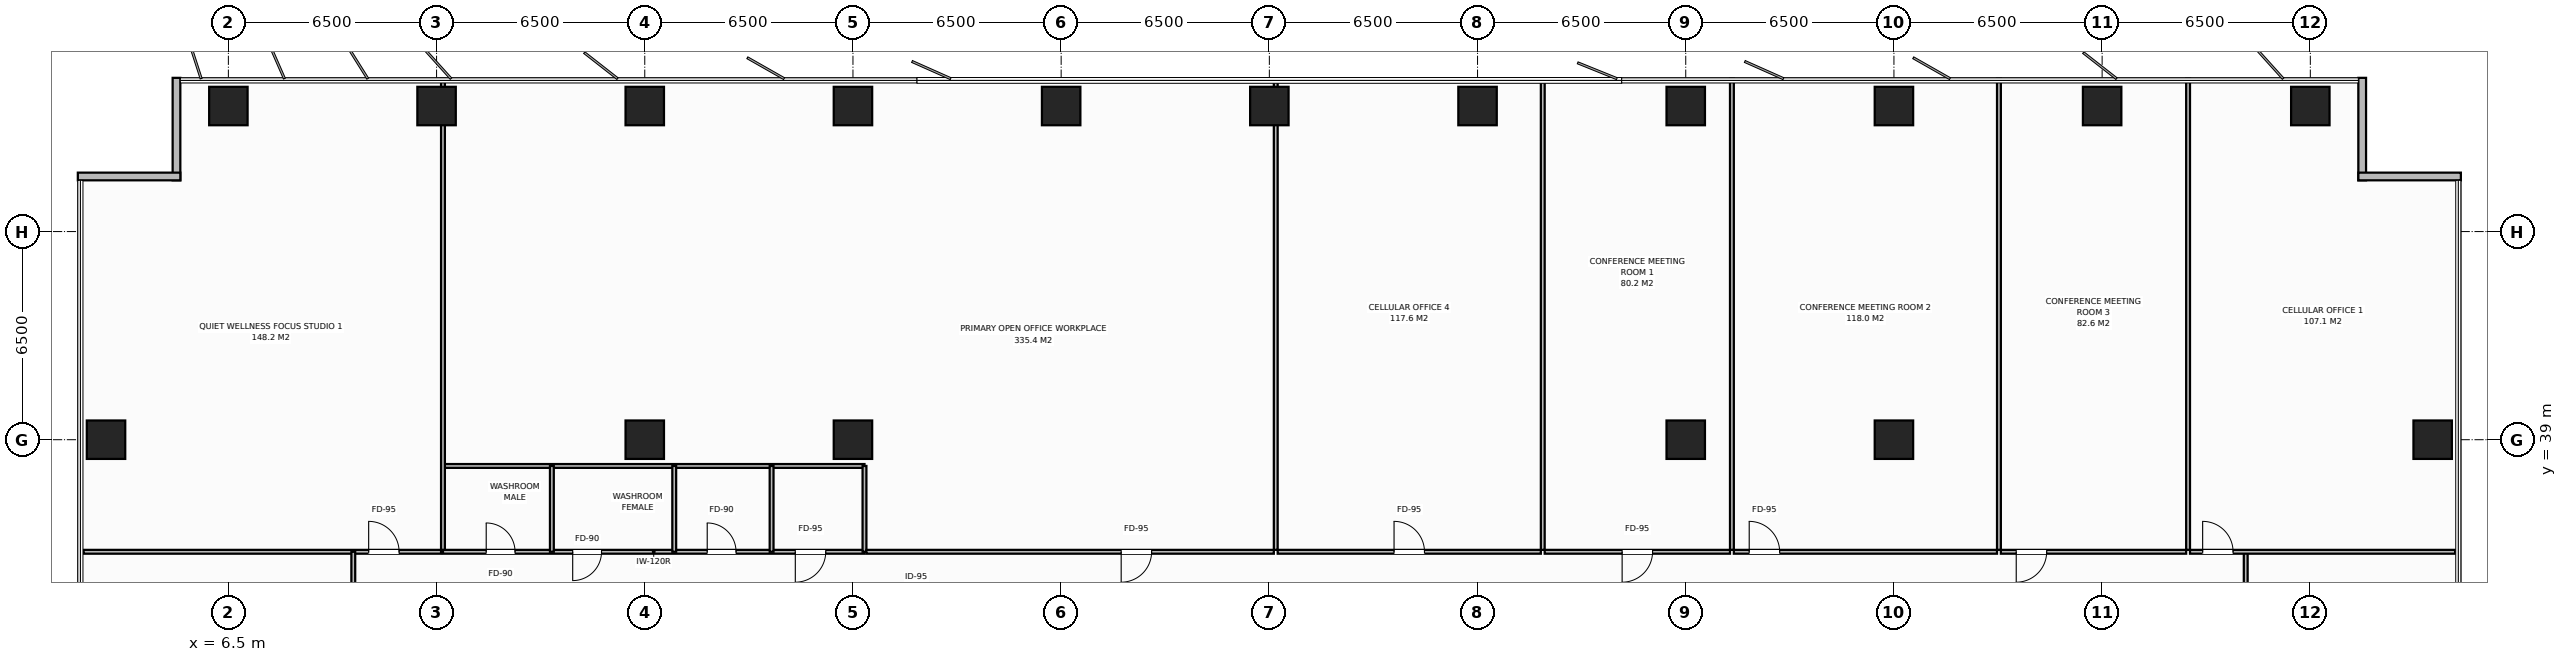
"""IFC4 building model, lengths in metres.
Left out: names, types, materials, properties, quantities, classifications, styles, units other than length and angle.
Written with IfcOpenShell. Run it as: python <this file> out.ifc"""

import sys

from ifc_helpers import new_model, si_unit, direction, frame, frame_2d, origin, origin_2d, place, context, subcontext, project, spatial, rectangle, extrude, element, fill, save


model = new_model("IFC4")
c1 = context("Model", 3, precision=1e-05, world=origin(), true_north=direction((0.0, 1.0)))
c2 = subcontext(c1, "Body", "Model", "MODEL_VIEW")
j1 = project(units=[si_unit("LENGTHUNIT", "METRE"), si_unit("PLANEANGLEUNIT", "RADIAN")], contexts=[c1])
p1 = place(None, origin())
s1 = spatial("IfcSite", under=j1, at=p1, CompositionType="ELEMENT")
p2 = place(p1, origin())
s2 = spatial("IfcBuilding", under=s1, at=p2, CompositionType="ELEMENT")
p3 = place(p2, frame((0.0, 0.0, 108.8)))
s3 = spatial("IfcBuildingStorey", under=s2, at=p3, CompositionType="ELEMENT", Elevation=108.8)
for number, where, z_axis, x_axis in (
    (1, (19.5, 39.0, 0.0), (0.0, 0.0, 1.0), (1.0, 0.0, 0.0)),
    (2, (58.5, 39.0, 0.0), (0.0, 0.0, 1.0), (1.0, 0.0, 0.0)),
    (3, (26.0, 39.0, 0.0), (0.0, 0.0, 1.0), (1.0, 0.0, 0.0)),
    (4, (52.0, 39.0, 0.0), (0.0, 0.0, 1.0), (1.0, 0.0, 0.0)),
    (5, (6.5, 49.42, 0.0), (0.0, 0.0, 1.0), (1.0, 0.0, 0.0)),
    (6, (13.0, 49.42, 0.0), (0.0, 0.0, 1.0), (1.0, 0.0, 0.0)),
    (7, (19.5, 49.42, 0.0), (0.0, 0.0, 1.0), (1.0, 0.0, 0.0)),
    (8, (26.0, 49.42, 0.0), (0.0, 0.0, 1.0), (1.0, 0.0, 0.0)),
    (9, (32.5, 49.42, 0.0), (0.0, 0.0, 1.0), (1.0, 0.0, 0.0)),
    (10, (39.0, 49.42, 0.0), (0.0, 0.0, 1.0), (1.0, 0.0, 0.0)),
    (11, (45.5, 49.42, 0.0), (0.0, 0.0, 1.0), (1.0, 0.0, 0.0)),
    (12, (52.0, 49.42, 0.0), (0.0, 0.0, 1.0), (1.0, 0.0, 0.0)),
    (13, (58.5, 49.42, 0.0), (0.0, 0.0, 1.0), (1.0, 0.0, 0.0)),
    (14, (65.0, 49.42, 0.0), (0.0, 0.0, 1.0), (1.0, 0.0, 0.0)),
    (15, (71.5, 49.42, 0.0), (0.0, 0.0, 1.0), (1.0, 0.0, 0.0)),
    (16, (2.68, 39.0, 0.0), (0.0, 0.0, 1.0), (1.0, 0.0, 0.0)),
    (17, (75.32, 39.0, 0.0), (0.0, 0.0, 1.0), (1.0, 0.0, 0.0)),
):
    element("IfcColumn", number, at=place(p3, frame(where, z_axis=z_axis, x_axis=x_axis)), inside=s3, PredefinedType="COLUMN", context=c2, shape_type="SweptSolid", body=[
        extrude(rectangle(XDim=1.2, YDim=1.2, at=origin_2d()), origin(), (0.0, 0.0, 1.0), 3.8),
    ])
for number, where, z_axis, x_axis in (
    (18, (4.88, 47.1, 0.0), (0.0, 0.0, 1.0), (0.0, 1.0, 0.0)),
    (19, (1.8, 47.22, 0.0), (0.0, 0.0, 1.0), (1.0, 0.0, 0.0)),
    (20, (73.12, 50.3, 0.0), (0.0, 0.0, 1.0), (0.0, -1.0, 0.0)),
    (21, (73.0, 47.22, 0.0), (0.0, 0.0, 1.0), (1.0, 0.0, 0.0)),
):
    element("IfcWall", number, at=place(p3, frame(where, z_axis=z_axis, x_axis=x_axis)), inside=s3, PredefinedType="STANDARD", context=c2, shape_type="SweptSolid", body=[
        extrude(rectangle(XDim=3.2, YDim=0.24, at=frame_2d((1.6, 0.0))), origin(), (0.0, 0.0, 1.0), 3.565),
    ])
p4 = place(p3, frame((69.483, 33.4, 0.0), z_axis=(0.0, 0.0, 1.0), x_axis=(0.0, 1.0, 0.0)))
e22 = element("IfcWall", 22, at=p4, inside=s3, PredefinedType="PARTITIONING", context=c2, shape_type="SweptSolid", body=[
    extrude(rectangle(XDim=2.1, YDim=0.12, at=frame_2d((1.05, 0.0))), origin(), (0.0, 0.0, 1.0), 3.565),
])
p5 = place(p3, frame((13.2, 35.5, 0.0), z_axis=(0.0, 0.0, 1.0), x_axis=(1.0, 0.0, 0.0)))
e23 = element("IfcWall", 23, at=p5, inside=s3, PredefinedType="PARTITIONING", context=c2, shape_type="SweptSolid", body=[
    extrude(rectangle(XDim=13.16, YDim=0.12, at=frame_2d((6.58, 0.0))), origin(), (0.0, 0.0, 1.0), 3.565),
])
p6 = place(p5, frame((1.35, 0.0, 0.0)))
e24 = element("IfcOpeningElement", 24, at=p6, cuts=e23, PredefinedType="OPENING", context=c2, shape_type="SweptSolid", body=[
    extrude(rectangle(XDim=0.9, YDim=2.15, at=frame_2d((0.45, 1.075))), frame((0.0, 0.07, 0.0), z_axis=(0.0, -1.0, 0.0), x_axis=(1.0, 0.0, 0.0)), (0.0, 0.0, 1.0), 0.14),
])
p7 = place(p5, frame((4.05, 0.0, 0.0)))
e25 = element("IfcOpeningElement", 25, at=p7, cuts=e23, PredefinedType="OPENING", context=c2, shape_type="SweptSolid", body=[
    extrude(rectangle(XDim=0.9, YDim=2.15, at=frame_2d((0.45, 1.075))), frame((0.0, 0.07, 0.0), z_axis=(0.0, -1.0, 0.0), x_axis=(1.0, 0.0, 0.0)), (0.0, 0.0, 1.0), 0.14),
])
p8 = place(p5, frame((8.25, 0.0, 0.0)))
e26 = element("IfcOpeningElement", 26, at=p8, cuts=e23, PredefinedType="OPENING", context=c2, shape_type="SweptSolid", body=[
    extrude(rectangle(XDim=0.9, YDim=2.15, at=frame_2d((0.45, 1.075))), frame((0.0, 0.07, 0.0), z_axis=(0.0, -1.0, 0.0), x_axis=(1.0, 0.0, 0.0)), (0.0, 0.0, 1.0), 0.14),
])
p9 = place(p5, frame((11.0, 0.0, 0.0)))
e27 = element("IfcOpeningElement", 27, at=p9, cuts=e23, PredefinedType="OPENING", context=c2, shape_type="SweptSolid", body=[
    extrude(rectangle(XDim=0.95, YDim=2.15, at=frame_2d((0.475, 1.075))), frame((0.0, 0.07, 0.0), z_axis=(0.0, -1.0, 0.0), x_axis=(1.0, 0.0, 0.0)), (0.0, 0.0, 1.0), 0.14),
])
p10 = place(p3, frame((13.2, 38.18, 0.0), z_axis=(0.0, 0.0, 1.0), x_axis=(1.0, 0.0, 0.0)))
e28 = element("IfcWall", 28, at=p10, inside=s3, PredefinedType="PARTITIONING", context=c2, shape_type="SweptSolid", body=[
    extrude(rectangle(XDim=13.16, YDim=0.12, at=frame_2d((6.58, 0.0))), origin(), (0.0, 0.0, 1.0), 3.565),
])
for number, where, z_axis, x_axis in (
    (29, (16.6, 35.5, 0.0), (0.0, 0.0, 1.0), (0.0, 1.0, 0.0)),
    (30, (20.42, 35.5, 0.0), (0.0, 0.0, 1.0), (0.0, 1.0, 0.0)),
    (31, (23.46, 35.5, 0.0), (0.0, 0.0, 1.0), (0.0, 1.0, 0.0)),
    (32, (26.36, 35.5, 0.0), (0.0, 0.0, 1.0), (0.0, 1.0, 0.0)),
):
    element("IfcWall", number, at=place(p3, frame(where, z_axis=z_axis, x_axis=x_axis)), inside=s3, PredefinedType="PARTITIONING", context=c2, shape_type="SweptSolid", body=[
        extrude(rectangle(XDim=2.68, YDim=0.12, at=frame_2d((1.34, 0.0))), origin(), (0.0, 0.0, 1.0), 3.565),
    ])
p11 = place(p3, frame((13.2, 35.56, 0.0), z_axis=(0.0, 0.0, 1.0), x_axis=(0.0, 1.0, 0.0)))
e33 = element("IfcWall", 33, at=p11, inside=s3, PredefinedType="PARTITIONING", context=c2, shape_type="SweptSolid", body=[
    extrude(rectangle(XDim=14.72, YDim=0.12, at=frame_2d((7.36, 0.0))), origin(), (0.0, 0.0, 1.0), 2.965),
])
p12 = place(p3, frame((1.98, 35.5, 0.0), z_axis=(0.0, 0.0, 1.0), x_axis=(1.0, 0.0, 0.0)))
e34 = element("IfcWall", 34, at=p12, inside=s3, PredefinedType="PARTITIONING", context=c2, shape_type="SweptSolid", body=[
    extrude(rectangle(XDim=11.16, YDim=0.12, at=frame_2d((5.58, 0.0))), origin(), (0.0, 0.0, 1.0), 3.565),
])
p13 = place(p12, frame((8.9, 0.0, 0.0)))
e35 = element("IfcOpeningElement", 35, at=p13, cuts=e34, PredefinedType="OPENING", context=c2, shape_type="SweptSolid", body=[
    extrude(rectangle(XDim=0.95, YDim=2.15, at=frame_2d((0.475, 1.075))), frame((0.0, 0.07, 0.0), z_axis=(0.0, -1.0, 0.0), x_axis=(1.0, 0.0, 0.0)), (0.0, 0.0, 1.0), 0.14),
])
p14 = place(p3, frame((39.2, 35.56, 0.0), z_axis=(0.0, 0.0, 1.0), x_axis=(0.0, 1.0, 0.0)))
e36 = element("IfcWall", 36, at=p14, inside=s3, PredefinedType="PARTITIONING", context=c2, shape_type="SweptSolid", body=[
    extrude(rectangle(XDim=14.72, YDim=0.12, at=frame_2d((7.36, 0.0))), origin(), (0.0, 0.0, 1.0), 2.965),
])
p15 = place(p3, frame((26.42, 35.5, 0.0), z_axis=(0.0, 0.0, 1.0), x_axis=(1.0, 0.0, 0.0)))
e37 = element("IfcWall", 37, at=p15, inside=s3, PredefinedType="PARTITIONING", context=c2, shape_type="SweptSolid", body=[
    extrude(rectangle(XDim=12.72, YDim=0.12, at=frame_2d((6.36, 0.0))), origin(), (0.0, 0.0, 1.0), 3.565),
])
p16 = place(p15, frame((7.954, 0.0, 0.0)))
e38 = element("IfcOpeningElement", 38, at=p16, cuts=e37, PredefinedType="OPENING", context=c2, shape_type="SweptSolid", body=[
    extrude(rectangle(XDim=0.95, YDim=2.15, at=frame_2d((0.475, 1.075))), frame((0.0, 0.07, 0.0), z_axis=(0.0, -1.0, 0.0), x_axis=(1.0, 0.0, 0.0)), (0.0, 0.0, 1.0), 0.14),
])
p17 = place(p3, frame((47.537, 35.56, 0.0), z_axis=(0.0, 0.0, 1.0), x_axis=(0.0, 1.0, 0.0)))
e39 = element("IfcWall", 39, at=p17, inside=s3, PredefinedType="PARTITIONING", context=c2, shape_type="SweptSolid", body=[
    extrude(rectangle(XDim=14.72, YDim=0.12, at=frame_2d((7.36, 0.0))), origin(), (0.0, 0.0, 1.0), 3.565),
])
p18 = place(p3, frame((39.26, 35.5, 0.0), z_axis=(0.0, 0.0, 1.0), x_axis=(1.0, 0.0, 0.0)))
e40 = element("IfcWall", 40, at=p18, inside=s3, PredefinedType="PARTITIONING", context=c2, shape_type="SweptSolid", body=[
    extrude(rectangle(XDim=8.217, YDim=0.12, at=frame_2d((4.108, 0.0))), origin(), (0.0, 0.0, 1.0), 3.565),
])
p19 = place(p18, frame((3.633, 0.0, 0.0)))
e41 = element("IfcOpeningElement", 41, at=p19, cuts=e40, PredefinedType="OPENING", context=c2, shape_type="SweptSolid", body=[
    extrude(rectangle(XDim=0.95, YDim=2.15, at=frame_2d((0.475, 1.075))), frame((0.0, 0.07, 0.0), z_axis=(0.0, -1.0, 0.0), x_axis=(1.0, 0.0, 0.0)), (0.0, 0.0, 1.0), 0.14),
])
p20 = place(p3, frame((53.442, 35.56, 0.0), z_axis=(0.0, 0.0, 1.0), x_axis=(0.0, 1.0, 0.0)))
e42 = element("IfcWall", 42, at=p20, inside=s3, PredefinedType="PARTITIONING", context=c2, shape_type="SweptSolid", body=[
    extrude(rectangle(XDim=14.72, YDim=0.12, at=frame_2d((7.36, 0.0))), origin(), (0.0, 0.0, 1.0), 3.565),
])
p21 = place(p3, frame((47.597, 35.5, 0.0), z_axis=(0.0, 0.0, 1.0), x_axis=(1.0, 0.0, 0.0)))
e43 = element("IfcWall", 43, at=p21, inside=s3, PredefinedType="PARTITIONING", context=c2, shape_type="SweptSolid", body=[
    extrude(rectangle(XDim=5.785, YDim=0.12, at=frame_2d((2.893, 0.0))), origin(), (0.0, 0.0, 1.0), 3.565),
])
p22 = place(p21, frame((2.417, 0.0, 0.0)))
e44 = element("IfcOpeningElement", 44, at=p22, cuts=e43, PredefinedType="OPENING", context=c2, shape_type="SweptSolid", body=[
    extrude(rectangle(XDim=0.95, YDim=2.15, at=frame_2d((0.475, 1.075))), frame((0.0, 0.07, 0.0), z_axis=(0.0, -1.0, 0.0), x_axis=(1.0, 0.0, 0.0)), (0.0, 0.0, 1.0), 0.14),
])
p23 = place(p3, frame((61.778, 35.56, 0.0), z_axis=(0.0, 0.0, 1.0), x_axis=(0.0, 1.0, 0.0)))
e45 = element("IfcWall", 45, at=p23, inside=s3, PredefinedType="PARTITIONING", context=c2, shape_type="SweptSolid", body=[
    extrude(rectangle(XDim=14.72, YDim=0.12, at=frame_2d((7.36, 0.0))), origin(), (0.0, 0.0, 1.0), 3.565),
])
p24 = place(p3, frame((53.502, 35.5, 0.0), z_axis=(0.0, 0.0, 1.0), x_axis=(1.0, 0.0, 0.0)))
e46 = element("IfcWall", 46, at=p24, inside=s3, PredefinedType="PARTITIONING", context=c2, shape_type="SweptSolid", body=[
    extrude(rectangle(XDim=8.217, YDim=0.12, at=frame_2d((4.108, 0.0))), origin(), (0.0, 0.0, 1.0), 3.565),
])
p25 = place(p24, frame((0.48, 0.0, 0.0)))
e47 = element("IfcOpeningElement", 47, at=p25, cuts=e46, PredefinedType="OPENING", context=c2, shape_type="SweptSolid", body=[
    extrude(rectangle(XDim=0.95, YDim=2.15, at=frame_2d((0.475, 1.075))), frame((0.0, 0.07, 0.0), z_axis=(0.0, -1.0, 0.0), x_axis=(1.0, 0.0, 0.0)), (0.0, 0.0, 1.0), 0.14),
])
p26 = place(p3, frame((67.683, 35.56, 0.0), z_axis=(0.0, 0.0, 1.0), x_axis=(0.0, 1.0, 0.0)))
e48 = element("IfcWall", 48, at=p26, inside=s3, PredefinedType="PARTITIONING", context=c2, shape_type="SweptSolid", body=[
    extrude(rectangle(XDim=14.72, YDim=0.12, at=frame_2d((7.36, 0.0))), origin(), (0.0, 0.0, 1.0), 3.565),
])
p27 = place(p3, frame((61.838, 35.5, 0.0), z_axis=(0.0, 0.0, 1.0), x_axis=(1.0, 0.0, 0.0)))
e49 = element("IfcWall", 49, at=p27, inside=s3, PredefinedType="PARTITIONING", context=c2, shape_type="SweptSolid", body=[
    extrude(rectangle(XDim=5.785, YDim=0.12, at=frame_2d((2.893, 0.0))), origin(), (0.0, 0.0, 1.0), 3.565),
])
p28 = place(p27, frame((0.48, 0.0, 0.0)))
e50 = element("IfcOpeningElement", 50, at=p28, cuts=e49, PredefinedType="OPENING", context=c2, shape_type="SweptSolid", body=[
    extrude(rectangle(XDim=0.95, YDim=2.15, at=frame_2d((0.475, 1.075))), frame((0.0, 0.07, 0.0), z_axis=(0.0, -1.0, 0.0), x_axis=(1.0, 0.0, 0.0)), (0.0, 0.0, 1.0), 0.14),
])
p29 = place(p3, frame((67.743, 35.5, 0.0), z_axis=(0.0, 0.0, 1.0), x_axis=(1.0, 0.0, 0.0)))
e51 = element("IfcWall", 51, at=p29, inside=s3, PredefinedType="PARTITIONING", context=c2, shape_type="SweptSolid", body=[
    extrude(rectangle(XDim=8.277, YDim=0.12, at=frame_2d((4.138, 0.0))), origin(), (0.0, 0.0, 1.0), 3.565),
])
p30 = place(p29, frame((0.395, 0.0, 0.0)))
e52 = element("IfcOpeningElement", 52, at=p30, cuts=e51, PredefinedType="OPENING", context=c2, shape_type="SweptSolid", body=[
    extrude(rectangle(XDim=0.95, YDim=2.15, at=frame_2d((0.475, 1.075))), frame((0.0, 0.07, 0.0), z_axis=(0.0, -1.0, 0.0), x_axis=(1.0, 0.0, 0.0)), (0.0, 0.0, 1.0), 0.14),
])
p31 = place(p3, frame((10.4, 26.0, 0.0), z_axis=(0.0, 0.0, 1.0), x_axis=(0.0, 1.0, 0.0)))
e53 = element("IfcWall", 53, at=p31, inside=s3, PredefinedType="PARTITIONING", context=c2, shape_type="SweptSolid", body=[
    extrude(rectangle(XDim=9.5, YDim=0.12, at=frame_2d((4.75, 0.0))), origin(), (0.0, 0.0, 1.0), 3.565),
])
p32 = place(p31, frame((3.225, 0.0, 0.0)))
e54 = element("IfcOpeningElement", 54, at=p32, cuts=e53, PredefinedType="OPENING", context=c2, shape_type="SweptSolid", body=[
    extrude(rectangle(XDim=0.95, YDim=2.15, at=frame_2d((0.475, 1.075))), frame((0.0, 0.07, 0.0), z_axis=(0.0, -1.0, 0.0), x_axis=(1.0, 0.0, 0.0)), (0.0, 0.0, 1.0), 0.14),
])
p33 = place(p6, origin())
e55 = element("IfcDoor", 55, at=p33, inside=s3, OperationType="SINGLE_SWING_LEFT", PredefinedType="DOOR", context=c2, shape_type="SweptSolid", body=[
    extrude(rectangle(XDim=0.9, YDim=2.15, at=frame_2d((0.45, 1.075))), frame((0.0, 0.025, 0.0), z_axis=(0.0, -1.0, 0.0), x_axis=(1.0, 0.0, 0.0)), (0.0, 0.0, 1.0), 0.05),
])
fill(e24, e55)
p34 = place(p7, origin())
e56 = element("IfcDoor", 56, at=p34, inside=s3, OperationType="SINGLE_SWING_RIGHT", PredefinedType="DOOR", context=c2, shape_type="SweptSolid", body=[
    extrude(rectangle(XDim=0.9, YDim=2.15, at=frame_2d((0.45, 1.075))), frame((0.0, 0.025, 0.0), z_axis=(0.0, -1.0, 0.0), x_axis=(1.0, 0.0, 0.0)), (0.0, 0.0, 1.0), 0.05),
])
fill(e25, e56)
p35 = place(p8, origin())
e57 = element("IfcDoor", 57, at=p35, inside=s3, OperationType="SINGLE_SWING_LEFT", PredefinedType="DOOR", context=c2, shape_type="SweptSolid", body=[
    extrude(rectangle(XDim=0.9, YDim=2.15, at=frame_2d((0.45, 1.075))), frame((0.0, 0.025, 0.0), z_axis=(0.0, -1.0, 0.0), x_axis=(1.0, 0.0, 0.0)), (0.0, 0.0, 1.0), 0.05),
])
fill(e26, e57)
p36 = place(p9, origin())
e58 = element("IfcDoor", 58, at=p36, inside=s3, OperationType="SINGLE_SWING_RIGHT", PredefinedType="DOOR", context=c2, shape_type="SweptSolid", body=[
    extrude(rectangle(XDim=0.95, YDim=2.15, at=frame_2d((0.475, 1.075))), frame((0.0, 0.025, 0.0), z_axis=(0.0, -1.0, 0.0), x_axis=(1.0, 0.0, 0.0)), (0.0, 0.0, 1.0), 0.05),
])
fill(e27, e58)
p37 = place(p13, origin())
e59 = element("IfcDoor", 59, at=p37, inside=s3, OperationType="SINGLE_SWING_LEFT", PredefinedType="DOOR", context=c2, shape_type="SweptSolid", body=[
    extrude(rectangle(XDim=0.95, YDim=2.15, at=frame_2d((0.475, 1.075))), frame((0.0, 0.025, 0.0), z_axis=(0.0, -1.0, 0.0), x_axis=(1.0, 0.0, 0.0)), (0.0, 0.0, 1.0), 0.05),
])
fill(e35, e59)
p38 = place(p16, origin())
e60 = element("IfcDoor", 60, at=p38, inside=s3, OperationType="SINGLE_SWING_RIGHT", PredefinedType="DOOR", context=c2, shape_type="SweptSolid", body=[
    extrude(rectangle(XDim=0.95, YDim=2.15, at=frame_2d((0.475, 1.075))), frame((0.0, 0.025, 0.0), z_axis=(0.0, -1.0, 0.0), x_axis=(1.0, 0.0, 0.0)), (0.0, 0.0, 1.0), 0.05),
])
fill(e38, e60)
p39 = place(p19, origin())
e61 = element("IfcDoor", 61, at=p39, inside=s3, OperationType="SINGLE_SWING_LEFT", PredefinedType="DOOR", context=c2, shape_type="SweptSolid", body=[
    extrude(rectangle(XDim=0.95, YDim=2.15, at=frame_2d((0.475, 1.075))), frame((0.0, 0.025, 0.0), z_axis=(0.0, -1.0, 0.0), x_axis=(1.0, 0.0, 0.0)), (0.0, 0.0, 1.0), 0.05),
])
fill(e41, e61)
p40 = place(p22, origin())
e62 = element("IfcDoor", 62, at=p40, inside=s3, OperationType="SINGLE_SWING_RIGHT", PredefinedType="DOOR", context=c2, shape_type="SweptSolid", body=[
    extrude(rectangle(XDim=0.95, YDim=2.15, at=frame_2d((0.475, 1.075))), frame((0.0, 0.025, 0.0), z_axis=(0.0, -1.0, 0.0), x_axis=(1.0, 0.0, 0.0)), (0.0, 0.0, 1.0), 0.05),
])
fill(e44, e62)
p41 = place(p25, origin())
e63 = element("IfcDoor", 63, at=p41, inside=s3, OperationType="SINGLE_SWING_LEFT", PredefinedType="DOOR", context=c2, shape_type="SweptSolid", body=[
    extrude(rectangle(XDim=0.95, YDim=2.15, at=frame_2d((0.475, 1.075))), frame((0.0, 0.025, 0.0), z_axis=(0.0, -1.0, 0.0), x_axis=(1.0, 0.0, 0.0)), (0.0, 0.0, 1.0), 0.05),
])
fill(e47, e63)
p42 = place(p28, origin())
e64 = element("IfcDoor", 64, at=p42, inside=s3, OperationType="SINGLE_SWING_RIGHT", PredefinedType="DOOR", context=c2, shape_type="SweptSolid", body=[
    extrude(rectangle(XDim=0.95, YDim=2.15, at=frame_2d((0.475, 1.075))), frame((0.0, 0.025, 0.0), z_axis=(0.0, -1.0, 0.0), x_axis=(1.0, 0.0, 0.0)), (0.0, 0.0, 1.0), 0.05),
])
fill(e50, e64)
p43 = place(p30, origin())
e65 = element("IfcDoor", 65, at=p43, inside=s3, OperationType="SINGLE_SWING_LEFT", PredefinedType="DOOR", context=c2, shape_type="SweptSolid", body=[
    extrude(rectangle(XDim=0.95, YDim=2.15, at=frame_2d((0.475, 1.075))), frame((0.0, 0.025, 0.0), z_axis=(0.0, -1.0, 0.0), x_axis=(1.0, 0.0, 0.0)), (0.0, 0.0, 1.0), 0.05),
])
fill(e52, e65)
save(model, sys.argv[1])
